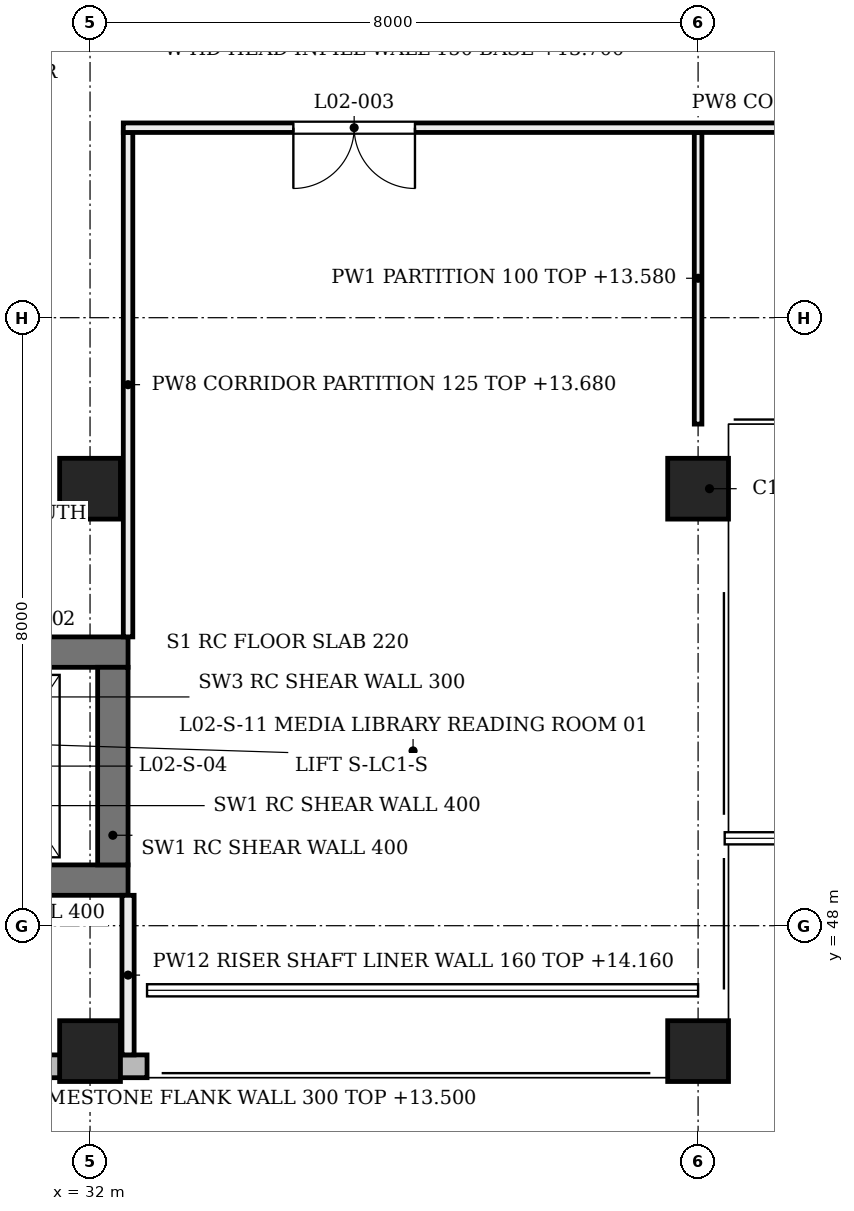
"""IFC4 building model, lengths in metres.
Left out: names, types, materials, properties, quantities, classifications, styles, units other than length and angle.
Written with IfcOpenShell. Run it as: python <this file> out.ifc"""

import sys

from ifc_helpers import new_model, si_unit, direction, frame, frame_2d, origin, origin_2d, place, context, subcontext, project, spatial, rectangle, extrude, element, fill, save


model = new_model("IFC4")
c1 = context("Model", 3, precision=1e-05, world=origin(), true_north=direction((0.0, 1.0)))
c2 = subcontext(c1, "Body", "Model", "MODEL_VIEW")
j1 = project(units=[si_unit("LENGTHUNIT", "METRE"), si_unit("PLANEANGLEUNIT", "RADIAN")], contexts=[c1])
p1 = place(None, origin())
s1 = spatial("IfcSite", under=j1, at=p1, CompositionType="ELEMENT")
p2 = place(p1, origin())
s2 = spatial("IfcBuilding", under=s1, at=p2, CompositionType="ELEMENT")
p3 = place(p2, frame((0.0, 0.0, 9.6)))
s3 = spatial("IfcBuildingStorey", under=s2, at=p3, CompositionType="ELEMENT", Elevation=9.6)
p4 = place(p3, frame((26.5, 48.6, 0.0), z_axis=(0.0, 0.0, 1.0), x_axis=(1.0, 0.0, 0.0)))
e1 = element("IfcWall", 1, at=p4, inside=s3, PredefinedType="SHEAR", context=c2, shape_type="SweptSolid", body=[
    extrude(rectangle(XDim=6.0, YDim=0.4, at=frame_2d((3.0, 0.0))), origin(), (0.0, 0.0, 1.0), 4.58),
])
p5 = place(p3, frame((26.5, 51.6, 0.0), z_axis=(0.0, 0.0, 1.0), x_axis=(1.0, 0.0, 0.0)))
e2 = element("IfcWall", 2, at=p5, inside=s3, PredefinedType="SHEAR", context=c2, shape_type="SweptSolid", body=[
    extrude(rectangle(XDim=6.0, YDim=0.4, at=frame_2d((3.0, 0.0))), origin(), (0.0, 0.0, 1.0), 4.58),
])
p6 = place(p5, frame((1.15, 0.0, 0.0)))
e3 = element("IfcOpeningElement", 3, at=p6, cuts=e2, PredefinedType="OPENING", context=c2, shape_type="SweptSolid", body=[
    extrude(rectangle(XDim=1.1, YDim=2.1, at=frame_2d((0.55, 1.05))), frame((0.0, 0.21, 0.0), z_axis=(0.0, -1.0, 0.0), x_axis=(1.0, 0.0, 0.0)), (0.0, 0.0, 1.0), 0.42),
])
p7 = place(p5, frame((3.75, 0.0, 0.0)))
e4 = element("IfcOpeningElement", 4, at=p7, cuts=e2, PredefinedType="OPENING", context=c2, shape_type="SweptSolid", body=[
    extrude(rectangle(XDim=1.1, YDim=2.1, at=frame_2d((0.55, 1.05))), frame((0.0, 0.21, 0.0), z_axis=(0.0, -1.0, 0.0), x_axis=(1.0, 0.0, 0.0)), (0.0, 0.0, 1.0), 0.42),
])
p8 = place(p3, frame((32.3, 48.8, 0.0), z_axis=(0.0, 0.0, 1.0), x_axis=(0.0, 1.0, 0.0)))
e5 = element("IfcWall", 5, at=p8, inside=s3, PredefinedType="SHEAR", context=c2, shape_type="SweptSolid", body=[
    extrude(rectangle(XDim=2.6, YDim=0.4, at=frame_2d((1.3, 0.0))), origin(), (0.0, 0.0, 1.0), 4.58),
])
for number, where, z_axis, x_axis in (
    (6, (32.0, 46.6, 0.0), (0.0, -0.204, 0.979), (1.0, 0.0, 0.0)),
    (7, (40.0, 46.6, 0.0), (0.0, -0.204, 0.979), (1.0, 0.0, 0.0)),
    (8, (32.0, 54.0, 0.0), (0.0, -0.204, 0.979), (1.0, 0.0, 0.0)),
):
    element("IfcColumn", number, at=place(p3, frame(where, z_axis=z_axis, x_axis=x_axis)), inside=s3, PredefinedType="COLUMN", context=c2, shape_type="SweptSolid", body=[
        extrude(rectangle(XDim=0.8, YDim=0.8, at=origin_2d()), origin(), (0.0, 0.0, 1.0), 4.903),
    ])
p9 = place(p3, frame((40.0, 54.046, -0.22), z_axis=(0.0, -0.203965661733, 0.978978043081), x_axis=(1.0, 0.0, 0.0)))
e9 = element("IfcColumn", 9, at=p9, inside=s3, PredefinedType="COLUMN", context=c2, shape_type="SweptSolid", body=[
    extrude(rectangle(XDim=0.8, YDim=0.8, at=origin_2d()), origin(), (0.0, 0.0, 1.0), 5.128),
])
p10 = place(p3, frame((26.25, 46.15, 0.0), z_axis=(0.0, 0.0, 1.0), x_axis=(1.0, 0.0, 0.0)))
e10 = element("IfcWall", 10, at=p10, inside=s3, PredefinedType="SOLIDWALL", context=c2, shape_type="SweptSolid", body=[
    extrude(rectangle(XDim=6.5, YDim=0.3, at=frame_2d((3.25, 0.0))), origin(), (0.0, 0.0, 1.0), 3.9),
])
p11 = place(p3, frame((32.5, 46.3, 0.0), z_axis=(0.0, 0.0, 1.0), x_axis=(0.0, 1.0, 0.0)))
e11 = element("IfcWall", 11, at=p11, inside=s3, PredefinedType="PARTITIONING", context=c2, shape_type="SweptSolid", body=[
    extrude(rectangle(XDim=2.1, YDim=0.16, at=frame_2d((1.05, 0.0))), origin(), (0.0, 0.0, 1.0), 4.56),
])
p12 = place(p3, frame((32.5, 51.8, 0.0), z_axis=(0.0, 0.0, 1.0), x_axis=(0.0, 1.0, 0.0)))
e12 = element("IfcWall", 12, at=p12, inside=s3, PredefinedType="PARTITIONING", context=c2, shape_type="SweptSolid", body=[
    extrude(rectangle(XDim=6.637, YDim=0.125, at=frame_2d((3.319, 0.0))), origin(), (0.0, 0.0, 1.0), 4.08),
])
p13 = place(p3, frame((40.0, 54.6, 0.0), z_axis=(0.0, 0.0, 1.0), x_axis=(0.0, 1.0, 0.0)))
e13 = element("IfcWall", 13, at=p13, inside=s3, PredefinedType="PARTITIONING", context=c2, shape_type="SweptSolid", body=[
    extrude(rectangle(XDim=3.837, YDim=0.1, at=frame_2d((1.919, 0.0))), origin(), (0.0, 0.0, 1.0), 3.98),
])
p14 = place(p3, frame((32.438, 58.5, 0.0), z_axis=(0.0, 0.0, 1.0), x_axis=(1.0, 0.0, 0.0)))
e14 = element("IfcWall", 14, at=p14, inside=s3, PredefinedType="PARTITIONING", context=c2, shape_type="SweptSolid", body=[
    extrude(rectangle(XDim=39.125, YDim=0.125, at=frame_2d((19.562, 0.0))), origin(), (0.0, 0.0, 1.0), 3.38),
])
p15 = place(p14, frame((2.238, 0.0, 0.0)))
e15 = element("IfcOpeningElement", 15, at=p15, cuts=e14, PredefinedType="OPENING", context=c2, shape_type="SweptSolid", body=[
    extrude(rectangle(XDim=1.6, YDim=2.2, at=frame_2d((0.8, 1.1))), frame((0.0, 0.073, 0.0), z_axis=(0.0, -1.0, 0.0), x_axis=(1.0, 0.0, 0.0)), (0.0, 0.0, 1.0), 0.145),
])
p16 = place(p14, frame((18.762, 0.0, 0.0)))
e16 = element("IfcOpeningElement", 16, at=p16, cuts=e14, PredefinedType="OPENING", context=c2, shape_type="SweptSolid", body=[
    extrude(rectangle(XDim=1.6, YDim=2.2, at=frame_2d((0.8, 1.1))), frame((0.0, 0.073, 0.0), z_axis=(0.0, -1.0, 0.0), x_axis=(1.0, 0.0, 0.0)), (0.0, 0.0, 1.0), 0.145),
])
p17 = place(p14, frame((35.288, 0.0, 0.0)))
e17 = element("IfcOpeningElement", 17, at=p17, cuts=e14, PredefinedType="OPENING", context=c2, shape_type="SweptSolid", body=[
    extrude(rectangle(XDim=1.6, YDim=2.2, at=frame_2d((0.8, 1.1))), frame((0.0, 0.073, 0.0), z_axis=(0.0, -1.0, 0.0), x_axis=(1.0, 0.0, 0.0)), (0.0, 0.0, 1.0), 0.145),
])
p18 = place(p15, frame((1.6, 0.0, 0.0), z_axis=(0.0, 0.0, 1.0), x_axis=(-1.0, 0.0, 0.0)))
e18 = element("IfcDoor", 18, at=p18, inside=s3, OperationType="DOUBLE_DOOR_SINGLE_SWING", PredefinedType="DOOR", context=c2, shape_type="SweptSolid", body=[
    extrude(rectangle(XDim=1.6, YDim=2.2, at=frame_2d((0.8, 1.1))), frame((0.0, 0.025, 0.0), z_axis=(0.0, -1.0, 0.0), x_axis=(1.0, 0.0, 0.0)), (0.0, 0.0, 1.0), 0.05),
])
fill(e15, e18)
save(model, sys.argv[1])
